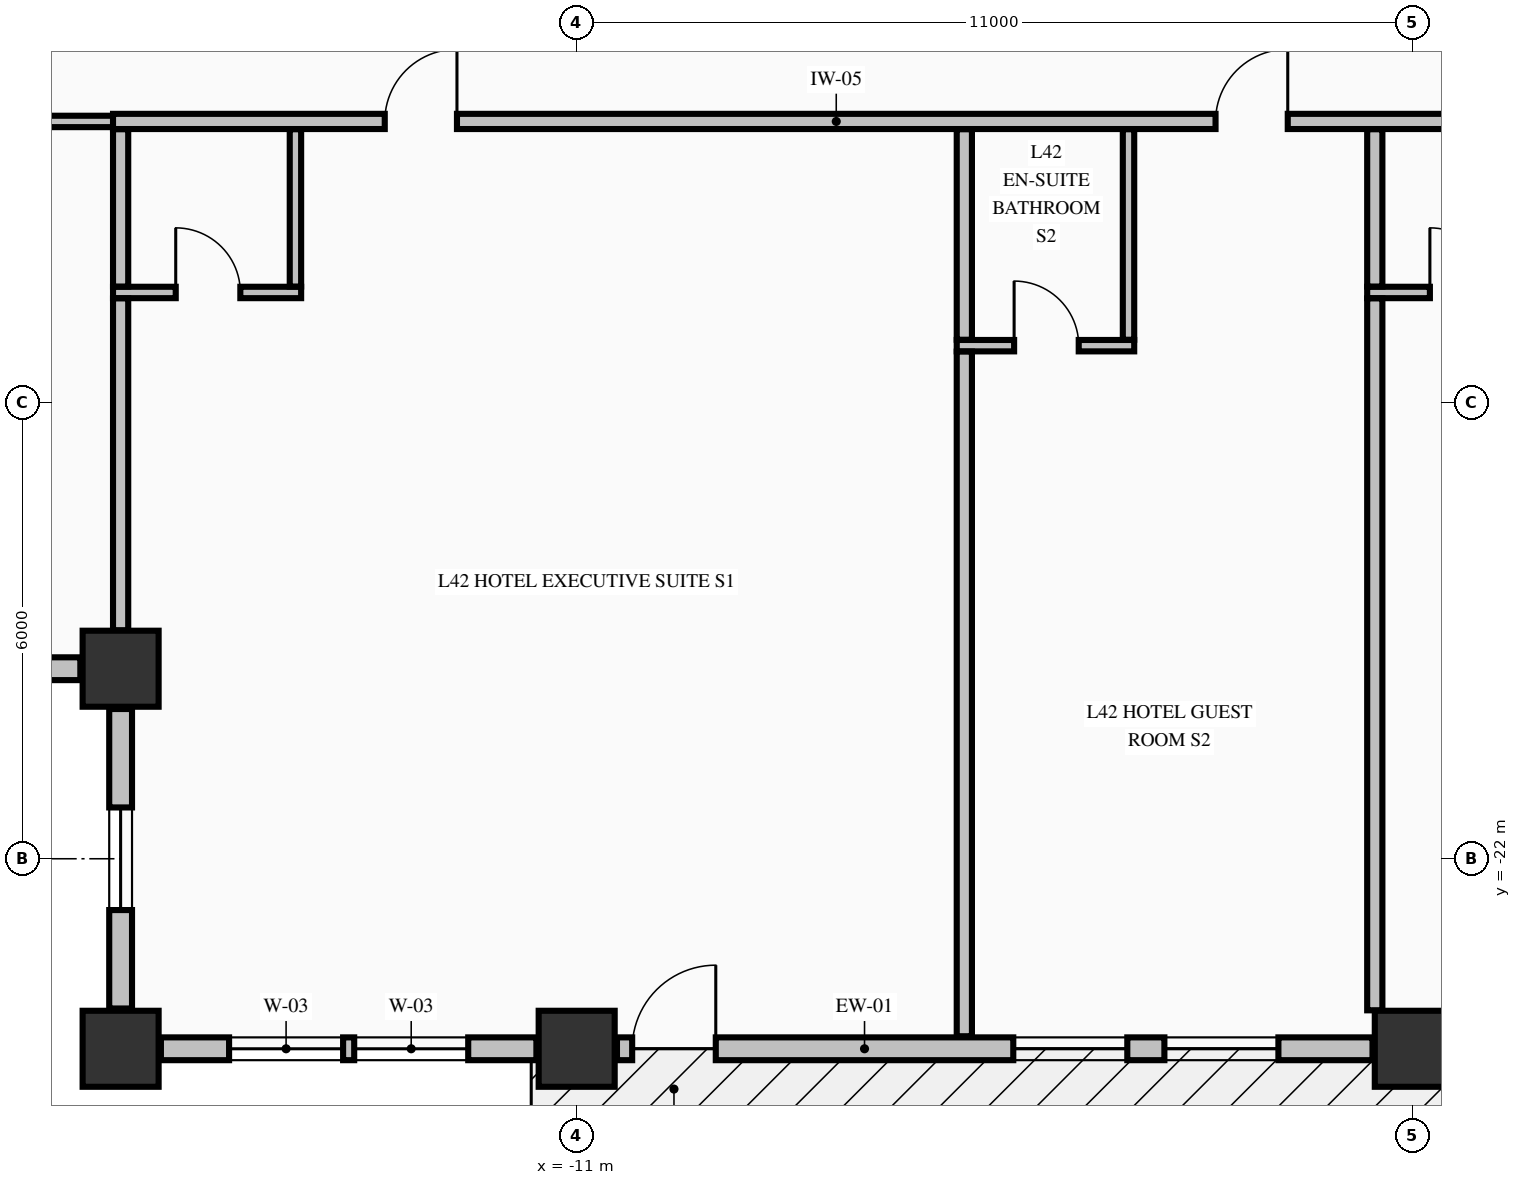
"""IFC4 building model, lengths in metres.
Left out: names, types, materials, properties, quantities, classifications, styles, units other than length and angle.
Written with IfcOpenShell. Run it as: python <this file> out.ifc"""

import sys

from ifc_helpers import new_model, si_unit, direction, frame, frame_2d, origin, origin_2d, place, context, subcontext, project, spatial, rectangle, extrude, element, fill, save


model = new_model("IFC4")
c1 = context("Model", 3, precision=1e-05, world=origin(), true_north=direction((0.0, 1.0)))
c2 = subcontext(c1, "Body", "Model", "MODEL_VIEW")
j1 = project(units=[si_unit("LENGTHUNIT", "METRE"), si_unit("PLANEANGLEUNIT", "RADIAN")], contexts=[c1])
p1 = place(None, origin())
s1 = spatial("IfcSite", under=j1, at=p1, CompositionType="ELEMENT")
p2 = place(p1, origin())
s2 = spatial("IfcBuilding", under=s1, at=p2, CompositionType="ELEMENT")
p3 = place(p2, frame((0.0, 0.0, 166.06)))
s3 = spatial("IfcBuildingStorey", under=s2, at=p3, CompositionType="ELEMENT", Elevation=166.06)
for number, where, z_axis, x_axis in (
    (1, (-17.0, -24.5, -0.25), (0.0, 0.0, 1.0), (1.0, 0.0, 0.0)),
    (2, (-11.0, -24.5, -0.25), (0.0, 0.0, 1.0), (1.0, 0.0, 0.0)),
    (3, (0.0, -24.5, -0.25), (0.0, 0.0, 1.0), (1.0, 0.0, 0.0)),
    (4, (-17.0, -19.5, -0.25), (0.0, 0.0, 1.0), (1.0, 0.0, 0.0)),
):
    element("IfcColumn", number, at=place(p3, frame(where, z_axis=z_axis, x_axis=x_axis)), inside=s3, PredefinedType="COLUMN", context=c2, shape_type="SweptSolid", body=[
        extrude(rectangle(XDim=1.0, YDim=1.0, at=origin_2d()), origin(), (0.0, 0.0, 1.0), 3.4),
    ])
p4 = place(p3, frame((-21.47, -19.5, 0.0), z_axis=(0.0, 0.0, 1.0), x_axis=(1.0, 0.0, 0.0)))
e5 = element("IfcWall", 5, at=p4, inside=s3, PredefinedType="STANDARD", context=c2, shape_type="SweptSolid", body=[
    extrude(rectangle(XDim=3.94, YDim=0.3, at=frame_2d((1.97, 0.0))), origin(), (0.0, 0.0, 1.0), 2.542),
])
p5 = place(p4, frame((1.295, 0.0, 0.68)))
e6 = element("IfcOpeningElement", 6, at=p5, cuts=e5, PredefinedType="OPENING", context=c2, shape_type="SweptSolid", body=[
    extrude(rectangle(XDim=1.35, YDim=1.42, at=frame_2d((0.675, 0.71))), frame((0.0, 0.16, 0.0), z_axis=(0.0, -1.0, 0.0), x_axis=(1.0, 0.0, 0.0)), (0.0, 0.0, 1.0), 0.32),
])
p6 = place(p3, frame((-17.0, -20.03, 0.0), z_axis=(0.0, 0.0, 1.0), x_axis=(0.0, -1.0, 0.0)))
e7 = element("IfcWall", 7, at=p6, inside=s3, PredefinedType="STANDARD", context=c2, shape_type="SweptSolid", body=[
    extrude(rectangle(XDim=3.94, YDim=0.3, at=frame_2d((1.97, 0.0))), origin(), (0.0, 0.0, 1.0), 2.542),
])
p7 = place(p6, frame((1.295, 0.0, 0.68)))
e8 = element("IfcOpeningElement", 8, at=p7, cuts=e7, PredefinedType="OPENING", context=c2, shape_type="SweptSolid", body=[
    extrude(rectangle(XDim=1.35, YDim=1.42, at=frame_2d((0.675, 0.71))), frame((0.0, 0.16, 0.0), z_axis=(0.0, -1.0, 0.0), x_axis=(1.0, 0.0, 0.0)), (0.0, 0.0, 1.0), 0.32),
])
p8 = place(p3, frame((-16.47, -24.5, 0.0), z_axis=(0.0, 0.0, 1.0), x_axis=(1.0, 0.0, 0.0)))
e9 = element("IfcWall", 9, at=p8, inside=s3, PredefinedType="STANDARD", context=c2, shape_type="SweptSolid", body=[
    extrude(rectangle(XDim=4.94, YDim=0.3, at=frame_2d((2.47, 0.0))), origin(), (0.0, 0.0, 1.0), 2.542),
])
p9 = place(p8, frame((0.897, 0.0, 0.72)))
e10 = element("IfcOpeningElement", 10, at=p9, cuts=e9, PredefinedType="OPENING", context=c2, shape_type="SweptSolid", body=[
    extrude(rectangle(XDim=1.5, YDim=1.6, at=frame_2d((0.75, 0.8))), frame((0.0, 0.16, 0.0), z_axis=(0.0, -1.0, 0.0), x_axis=(1.0, 0.0, 0.0)), (0.0, 0.0, 1.0), 0.32),
])
p10 = place(p8, frame((2.543, 0.0, 0.72)))
e11 = element("IfcOpeningElement", 11, at=p10, cuts=e9, PredefinedType="OPENING", context=c2, shape_type="SweptSolid", body=[
    extrude(rectangle(XDim=1.5, YDim=1.6, at=frame_2d((0.75, 0.8))), frame((0.0, 0.16, 0.0), z_axis=(0.0, -1.0, 0.0), x_axis=(1.0, 0.0, 0.0)), (0.0, 0.0, 1.0), 0.32),
])
p11 = place(p3, frame((-10.47, -24.5, 0.0), z_axis=(0.0, 0.0, 1.0), x_axis=(1.0, 0.0, 0.0)))
e12 = element("IfcWall", 12, at=p11, inside=s3, PredefinedType="STANDARD", context=c2, shape_type="SweptSolid", body=[
    extrude(rectangle(XDim=9.94, YDim=0.3, at=frame_2d((4.97, 0.0))), origin(), (0.0, 0.0, 1.0), 2.542),
])
p12 = place(p11, frame((0.2, 0.0, 0.0)))
e13 = element("IfcOpeningElement", 13, at=p12, cuts=e12, PredefinedType="OPENING", context=c2, shape_type="SweptSolid", body=[
    extrude(rectangle(XDim=1.1, YDim=2.15, at=frame_2d((0.55, 1.075))), frame((0.0, 0.16, 0.0), z_axis=(0.0, -1.0, 0.0), x_axis=(1.0, 0.0, 0.0)), (0.0, 0.0, 1.0), 0.32),
])
p13 = place(p11, frame((5.214, 0.0, 0.72)))
e14 = element("IfcOpeningElement", 14, at=p13, cuts=e12, PredefinedType="OPENING", context=c2, shape_type="SweptSolid", body=[
    extrude(rectangle(XDim=1.5, YDim=1.6, at=frame_2d((0.75, 0.8))), frame((0.0, 0.16, 0.0), z_axis=(0.0, -1.0, 0.0), x_axis=(1.0, 0.0, 0.0)), (0.0, 0.0, 1.0), 0.32),
])
p14 = place(p11, frame((7.202, 0.0, 0.72)))
e15 = element("IfcOpeningElement", 15, at=p14, cuts=e12, PredefinedType="OPENING", context=c2, shape_type="SweptSolid", body=[
    extrude(rectangle(XDim=1.5, YDim=1.6, at=frame_2d((0.75, 0.8))), frame((0.0, 0.16, 0.0), z_axis=(0.0, -1.0, 0.0), x_axis=(1.0, 0.0, 0.0)), (0.0, 0.0, 1.0), 0.32),
])
p15 = place(p3, frame((-6.0, -15.25, 0.0), z_axis=(0.0, 0.0, 1.0), x_axis=(1.0, 0.0, 0.0)))
e16 = element("IfcWall", 16, at=p15, inside=s3, PredefinedType="PARTITIONING", context=c2, shape_type="SweptSolid", body=[
    extrude(rectangle(XDim=2.335, YDim=0.15, at=frame_2d((1.167, 0.0))), origin(), (0.0, 0.0, 1.0), 3.15),
])
p16 = place(p15, frame((0.755, 0.0, 0.0)))
e17 = element("IfcOpeningElement", 17, at=p16, cuts=e16, PredefinedType="OPENING", context=c2, shape_type="SweptSolid", body=[
    extrude(rectangle(XDim=0.85, YDim=2.1, at=frame_2d((0.425, 1.05))), frame((0.0, 0.085, 0.0), z_axis=(0.0, -1.0, 0.0), x_axis=(1.0, 0.0, 0.0)), (0.0, 0.0, 1.0), 0.17),
])
p17 = place(p3, frame((-17.1, -14.55, 0.0), z_axis=(0.0, 0.0, 1.0), x_axis=(1.0, 0.0, 0.0)))
e18 = element("IfcWall", 18, at=p17, inside=s3, PredefinedType="PARTITIONING", context=c2, shape_type="SweptSolid", body=[
    extrude(rectangle(XDim=2.475, YDim=0.15, at=frame_2d((1.238, 0.0))), origin(), (0.0, 0.0, 1.0), 3.15),
])
p18 = place(p17, frame((0.825, 0.0, 0.0)))
e19 = element("IfcOpeningElement", 19, at=p18, cuts=e18, PredefinedType="OPENING", context=c2, shape_type="SweptSolid", body=[
    extrude(rectangle(XDim=0.85, YDim=2.1, at=frame_2d((0.425, 1.05))), frame((0.0, 0.085, 0.0), z_axis=(0.0, -1.0, 0.0), x_axis=(1.0, 0.0, 0.0)), (0.0, 0.0, 1.0), 0.17),
])
p19 = place(p3, frame((-0.6, -14.55, 0.0), z_axis=(0.0, 0.0, 1.0), x_axis=(1.0, 0.0, 0.0)))
e20 = element("IfcWall", 20, at=p19, inside=s3, PredefinedType="PARTITIONING", context=c2, shape_type="SweptSolid", body=[
    extrude(rectangle(XDim=2.475, YDim=0.15, at=frame_2d((1.238, 0.0))), origin(), (0.0, 0.0, 1.0), 3.15),
])
p20 = place(p19, frame((0.825, 0.0, 0.0)))
e21 = element("IfcOpeningElement", 21, at=p20, cuts=e20, PredefinedType="OPENING", context=c2, shape_type="SweptSolid", body=[
    extrude(rectangle(XDim=0.85, YDim=2.1, at=frame_2d((0.425, 1.05))), frame((0.0, 0.085, 0.0), z_axis=(0.0, -1.0, 0.0), x_axis=(1.0, 0.0, 0.0)), (0.0, 0.0, 1.0), 0.17),
])
p21 = place(p3, frame((-20.075, -12.3, 0.0), z_axis=(0.0, 0.0, 1.0), x_axis=(1.0, 0.0, 0.0)))
e22 = element("IfcWall", 22, at=p21, inside=s3, PredefinedType="PARTITIONING", context=c2, shape_type="SweptSolid", body=[
    extrude(rectangle(XDim=3.175, YDim=0.15, at=frame_2d((1.587, 0.0))), origin(), (0.0, 0.0, 1.0), 3.15),
])
p22 = place(p3, frame((-17.1, -12.3, 0.0), z_axis=(0.0, 0.0, 1.0), x_axis=(1.0, 0.0, 0.0)))
e23 = element("IfcWall", 23, at=p22, inside=s3, PredefinedType="PARTITIONING", context=c2, shape_type="SweptSolid", body=[
    extrude(rectangle(XDim=39.2, YDim=0.2, at=frame_2d((19.6, 0.0))), origin(), (0.0, 0.0, 1.0), 3.15),
])
p23 = place(p22, frame((3.575, 0.0, 0.0)))
e24 = element("IfcOpeningElement", 24, at=p23, cuts=e23, PredefinedType="OPENING", context=c2, shape_type="SweptSolid", body=[
    extrude(rectangle(XDim=0.95, YDim=2.15, at=frame_2d((0.475, 1.075))), frame((0.0, 0.11, 0.0), z_axis=(0.0, -1.0, 0.0), x_axis=(1.0, 0.0, 0.0)), (0.0, 0.0, 1.0), 0.22),
])
p24 = place(p22, frame((14.505, 0.0, 0.0)))
e25 = element("IfcOpeningElement", 25, at=p24, cuts=e23, PredefinedType="OPENING", context=c2, shape_type="SweptSolid", body=[
    extrude(rectangle(XDim=0.95, YDim=2.15, at=frame_2d((0.475, 1.075))), frame((0.0, 0.11, 0.0), z_axis=(0.0, -1.0, 0.0), x_axis=(1.0, 0.0, 0.0)), (0.0, 0.0, 1.0), 0.22),
])
p25 = place(p22, frame((20.475, 0.0, 0.0)))
e26 = element("IfcOpeningElement", 26, at=p25, cuts=e23, PredefinedType="OPENING", context=c2, shape_type="SweptSolid", body=[
    extrude(rectangle(XDim=0.95, YDim=2.15, at=frame_2d((0.475, 1.075))), frame((0.0, 0.11, 0.0), z_axis=(0.0, -1.0, 0.0), x_axis=(1.0, 0.0, 0.0)), (0.0, 0.0, 1.0), 0.22),
])
p26 = place(p22, frame((26.475, 0.0, 0.0)))
e27 = element("IfcOpeningElement", 27, at=p26, cuts=e23, PredefinedType="OPENING", context=c2, shape_type="SweptSolid", body=[
    extrude(rectangle(XDim=0.95, YDim=2.15, at=frame_2d((0.475, 1.075))), frame((0.0, 0.11, 0.0), z_axis=(0.0, -1.0, 0.0), x_axis=(1.0, 0.0, 0.0)), (0.0, 0.0, 1.0), 0.22),
])
p27 = place(p22, frame((34.775, 0.0, 0.0)))
e28 = element("IfcOpeningElement", 28, at=p27, cuts=e23, PredefinedType="OPENING", context=c2, shape_type="SweptSolid", body=[
    extrude(rectangle(XDim=0.95, YDim=2.15, at=frame_2d((0.475, 1.075))), frame((0.0, 0.11, 0.0), z_axis=(0.0, -1.0, 0.0), x_axis=(1.0, 0.0, 0.0)), (0.0, 0.0, 1.0), 0.22),
])
p28 = place(p3, frame((-17.0, -18.994, 0.0), z_axis=(0.0, 0.0, 1.0), x_axis=(0.0, 1.0, 0.0)))
e29 = element("IfcWall", 29, at=p28, inside=s3, PredefinedType="PARTITIONING", context=c2, shape_type="SweptSolid", body=[
    extrude(rectangle(XDim=4.366, YDim=0.2, at=frame_2d((2.183, 0.0))), origin(), (0.0, 0.0, 1.0), 3.15),
])
p29 = place(p3, frame((-17.0, -14.472, 0.0), z_axis=(0.0, 0.0, 1.0), x_axis=(0.0, 1.0, 0.0)))
e30 = element("IfcWall", 30, at=p29, inside=s3, PredefinedType="PARTITIONING", context=c2, shape_type="SweptSolid", body=[
    extrude(rectangle(XDim=2.069, YDim=0.2, at=frame_2d((1.034, 0.0))), origin(), (0.0, 0.0, 1.0), 3.15),
])
p30 = place(p3, frame((-14.7, -14.472, 0.0), z_axis=(0.0, 0.0, 1.0), x_axis=(0.0, 1.0, 0.0)))
e31 = element("IfcWall", 31, at=p30, inside=s3, PredefinedType="PARTITIONING", context=c2, shape_type="SweptSolid", body=[
    extrude(rectangle(XDim=2.069, YDim=0.15, at=frame_2d((1.034, 0.0))), origin(), (0.0, 0.0, 1.0), 3.15),
])
p31 = place(p3, frame((-5.9, -24.335, 0.0), z_axis=(0.0, 0.0, 1.0), x_axis=(0.0, 1.0, 0.0)))
e32 = element("IfcWall", 32, at=p31, inside=s3, PredefinedType="PARTITIONING", context=c2, shape_type="SweptSolid", body=[
    extrude(rectangle(XDim=9.007, YDim=0.2, at=frame_2d((4.503, 0.0))), origin(), (0.0, 0.0, 1.0), 3.15),
])
p32 = place(p3, frame((-5.9, -15.172, 0.0), z_axis=(0.0, 0.0, 1.0), x_axis=(0.0, 1.0, 0.0)))
e33 = element("IfcWall", 33, at=p32, inside=s3, PredefinedType="PARTITIONING", context=c2, shape_type="SweptSolid", body=[
    extrude(rectangle(XDim=2.769, YDim=0.2, at=frame_2d((1.385, 0.0))), origin(), (0.0, 0.0, 1.0), 3.15),
])
p33 = place(p3, frame((-3.74, -15.172, 0.0), z_axis=(0.0, 0.0, 1.0), x_axis=(0.0, 1.0, 0.0)))
e34 = element("IfcWall", 34, at=p33, inside=s3, PredefinedType="PARTITIONING", context=c2, shape_type="SweptSolid", body=[
    extrude(rectangle(XDim=2.769, YDim=0.15, at=frame_2d((1.385, 0.0))), origin(), (0.0, 0.0, 1.0), 3.15),
])
p34 = place(p3, frame((-0.5, -23.994, 0.0), z_axis=(0.0, 0.0, 1.0), x_axis=(0.0, 1.0, 0.0)))
e35 = element("IfcWall", 35, at=p34, inside=s3, PredefinedType="PARTITIONING", context=c2, shape_type="SweptSolid", body=[
    extrude(rectangle(XDim=9.366, YDim=0.2, at=frame_2d((4.683, 0.0))), origin(), (0.0, 0.0, 1.0), 3.15),
])
p35 = place(p3, frame((-0.5, -14.472, 0.0), z_axis=(0.0, 0.0, 1.0), x_axis=(0.0, 1.0, 0.0)))
e36 = element("IfcWall", 36, at=p35, inside=s3, PredefinedType="PARTITIONING", context=c2, shape_type="SweptSolid", body=[
    extrude(rectangle(XDim=2.069, YDim=0.2, at=frame_2d((1.034, 0.0))), origin(), (0.0, 0.0, 1.0), 3.15),
])
p36 = place(p7, origin())
e37 = element("IfcWindow", 37, at=p36, inside=s3, PartitioningType="SINGLE_PANEL", PredefinedType="WINDOW", context=c2, shape_type="SweptSolid", body=[
    extrude(rectangle(XDim=1.35, YDim=1.42, at=frame_2d((0.675, 0.71))), frame((0.0, 0.03, 0.0), z_axis=(0.0, -1.0, 0.0), x_axis=(1.0, 0.0, 0.0)), (0.0, 0.0, 1.0), 0.06),
])
fill(e8, e37)
p37 = place(p9, origin())
e38 = element("IfcWindow", 38, at=p37, inside=s3, PartitioningType="SINGLE_PANEL", PredefinedType="WINDOW", context=c2, shape_type="SweptSolid", body=[
    extrude(rectangle(XDim=1.5, YDim=1.6, at=frame_2d((0.75, 0.8))), frame((0.0, 0.03, 0.0), z_axis=(0.0, -1.0, 0.0), x_axis=(1.0, 0.0, 0.0)), (0.0, 0.0, 1.0), 0.06),
])
fill(e10, e38)
p38 = place(p10, origin())
e39 = element("IfcWindow", 39, at=p38, inside=s3, PartitioningType="SINGLE_PANEL", PredefinedType="WINDOW", context=c2, shape_type="SweptSolid", body=[
    extrude(rectangle(XDim=1.5, YDim=1.6, at=frame_2d((0.75, 0.8))), frame((0.0, 0.03, 0.0), z_axis=(0.0, -1.0, 0.0), x_axis=(1.0, 0.0, 0.0)), (0.0, 0.0, 1.0), 0.06),
])
fill(e11, e39)
p39 = place(p12, origin())
e40 = element("IfcDoor", 40, at=p39, inside=s3, OperationType="SINGLE_SWING_RIGHT", PredefinedType="DOOR", context=c2, shape_type="SweptSolid", body=[
    extrude(rectangle(XDim=1.1, YDim=2.15, at=frame_2d((0.55, 1.075))), frame((0.0, 0.025, 0.0), z_axis=(0.0, -1.0, 0.0), x_axis=(1.0, 0.0, 0.0)), (0.0, 0.0, 1.0), 0.05),
])
fill(e13, e40)
p40 = place(p13, origin())
e41 = element("IfcWindow", 41, at=p40, inside=s3, PartitioningType="SINGLE_PANEL", PredefinedType="WINDOW", context=c2, shape_type="SweptSolid", body=[
    extrude(rectangle(XDim=1.5, YDim=1.6, at=frame_2d((0.75, 0.8))), frame((0.0, 0.03, 0.0), z_axis=(0.0, -1.0, 0.0), x_axis=(1.0, 0.0, 0.0)), (0.0, 0.0, 1.0), 0.06),
])
fill(e14, e41)
p41 = place(p14, origin())
e42 = element("IfcWindow", 42, at=p41, inside=s3, PartitioningType="SINGLE_PANEL", PredefinedType="WINDOW", context=c2, shape_type="SweptSolid", body=[
    extrude(rectangle(XDim=1.5, YDim=1.6, at=frame_2d((0.75, 0.8))), frame((0.0, 0.03, 0.0), z_axis=(0.0, -1.0, 0.0), x_axis=(1.0, 0.0, 0.0)), (0.0, 0.0, 1.0), 0.06),
])
fill(e15, e42)
p42 = place(p23, origin())
e43 = element("IfcDoor", 43, at=p42, inside=s3, OperationType="SINGLE_SWING_RIGHT", PredefinedType="DOOR", context=c2, shape_type="SweptSolid", body=[
    extrude(rectangle(XDim=0.95, YDim=2.15, at=frame_2d((0.475, 1.075))), frame((0.0, 0.025, 0.0), z_axis=(0.0, -1.0, 0.0), x_axis=(1.0, 0.0, 0.0)), (0.0, 0.0, 1.0), 0.05),
])
fill(e24, e43)
p43 = place(p18, origin())
e44 = element("IfcDoor", 44, at=p43, inside=s3, OperationType="SINGLE_SWING_LEFT", PredefinedType="DOOR", context=c2, shape_type="SweptSolid", body=[
    extrude(rectangle(XDim=0.85, YDim=2.1, at=frame_2d((0.425, 1.05))), frame((0.0, 0.025, 0.0), z_axis=(0.0, -1.0, 0.0), x_axis=(1.0, 0.0, 0.0)), (0.0, 0.0, 1.0), 0.05),
])
fill(e19, e44)
p44 = place(p24, origin())
e45 = element("IfcDoor", 45, at=p44, inside=s3, OperationType="SINGLE_SWING_RIGHT", PredefinedType="DOOR", context=c2, shape_type="SweptSolid", body=[
    extrude(rectangle(XDim=0.95, YDim=2.15, at=frame_2d((0.475, 1.075))), frame((0.0, 0.025, 0.0), z_axis=(0.0, -1.0, 0.0), x_axis=(1.0, 0.0, 0.0)), (0.0, 0.0, 1.0), 0.05),
])
fill(e25, e45)
p45 = place(p16, origin())
e46 = element("IfcDoor", 46, at=p45, inside=s3, OperationType="SINGLE_SWING_LEFT", PredefinedType="DOOR", context=c2, shape_type="SweptSolid", body=[
    extrude(rectangle(XDim=0.85, YDim=2.1, at=frame_2d((0.425, 1.05))), frame((0.0, 0.025, 0.0), z_axis=(0.0, -1.0, 0.0), x_axis=(1.0, 0.0, 0.0)), (0.0, 0.0, 1.0), 0.05),
])
fill(e17, e46)
p46 = place(p20, origin())
e47 = element("IfcDoor", 47, at=p46, inside=s3, OperationType="SINGLE_SWING_LEFT", PredefinedType="DOOR", context=c2, shape_type="SweptSolid", body=[
    extrude(rectangle(XDim=0.85, YDim=2.1, at=frame_2d((0.425, 1.05))), frame((0.0, 0.025, 0.0), z_axis=(0.0, -1.0, 0.0), x_axis=(1.0, 0.0, 0.0)), (0.0, 0.0, 1.0), 0.05),
])
fill(e21, e47)
save(model, sys.argv[1])
